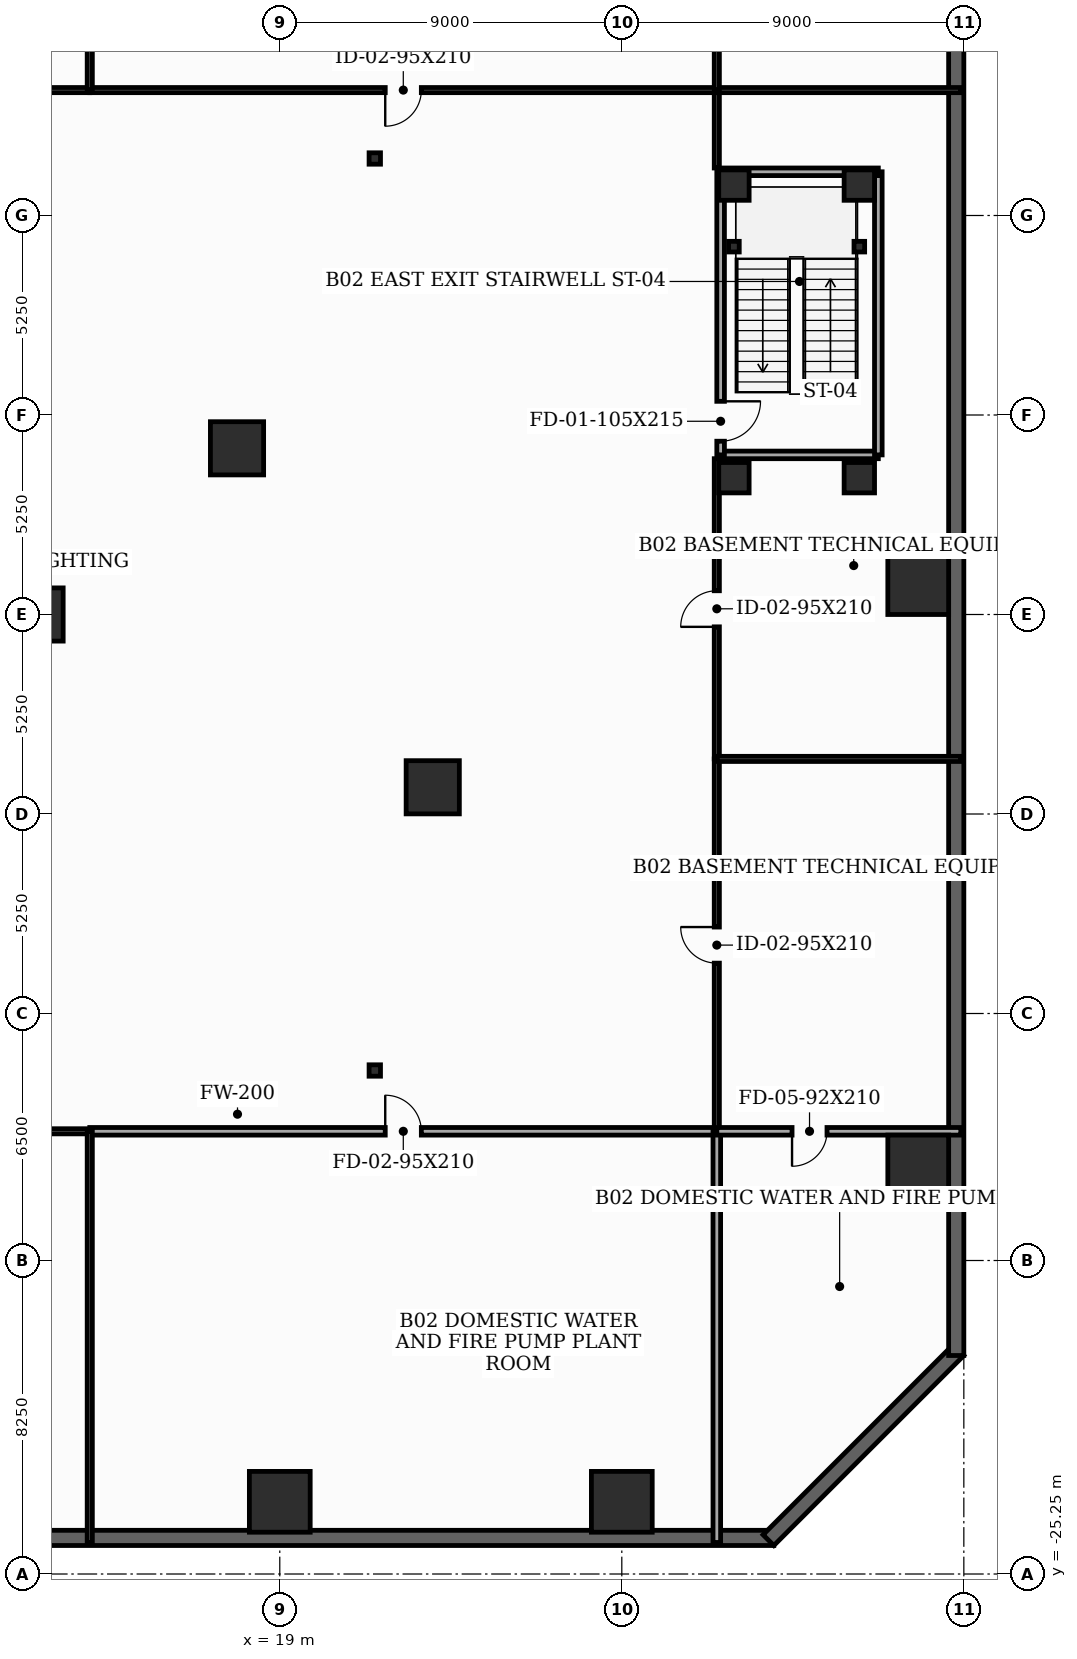
"""IFC4 building model, lengths in metres.
Left out: names, types, materials, properties, quantities, classifications, styles, units other than length and angle.
Written with IfcOpenShell. Run it as: python <this file> out.ifc"""

import sys

from ifc_helpers import new_model, si_unit, direction, frame, frame_2d, origin, origin_2d, place, context, subcontext, project, spatial, rectangle, i_section, extrude, element, fill, save


model = new_model("IFC4")
c1 = context("Model", 3, precision=1e-05, world=origin(), true_north=direction((0.0, 1.0)))
c2 = subcontext(c1, "Body", "Model", "MODEL_VIEW")
j1 = project(units=[si_unit("LENGTHUNIT", "METRE"), si_unit("PLANEANGLEUNIT", "RADIAN")], contexts=[c1])
p1 = place(None, origin())
s1 = spatial("IfcSite", under=j1, at=p1, CompositionType="ELEMENT")
p2 = place(p1, origin())
s2 = spatial("IfcBuilding", under=s1, at=p2, CompositionType="ELEMENT")
p3 = place(p2, frame((0.0, 0.0, -9.6)))
s3 = spatial("IfcBuildingStorey", under=s2, at=p3, CompositionType="ELEMENT", Elevation=-9.6)
p4 = place(p3, frame((12.6, 0.0, 0.0), z_axis=(0.0, 0.0, 1.0), x_axis=(1.0, 0.0, 0.0)))
e1 = element("IfcColumn", 1, at=p4, inside=s3, PredefinedType="COLUMN", context=c2, shape_type="SweptSolid", body=[
    extrude(rectangle(XDim=1.4, YDim=1.4, at=origin_2d()), origin(), (0.0, 0.0, 1.0), 4.8),
])
for number, where, z_axis, x_axis in (
    (2, (19.0, -23.35, 0.0), (0.0, 0.0, 1.0), (1.0, 0.0, 0.0)),
    (3, (28.0, -23.35, 0.0), (0.0, 0.0, 1.0), (1.0, 0.0, 0.0)),
    (4, (35.8, -14.5, 0.0), (0.0, 0.0, 1.0), (1.0, 0.0, 0.0)),
    (5, (35.8, 0.8, 0.0), (0.0, 0.0, 1.0), (1.0, 0.0, 0.0)),
):
    element("IfcColumn", number, at=place(p3, frame(where, z_axis=z_axis, x_axis=x_axis)), inside=s3, PredefinedType="COLUMN", context=c2, shape_type="SweptSolid", body=[
        extrude(rectangle(XDim=1.6, YDim=1.6, at=origin_2d()), origin(), (0.0, 0.0, 1.0), 4.8),
    ])
for number, where, z_axis, x_axis in (
    (6, (23.025, -4.547, 0.0), (0.0, 0.0, 1.0), (1.0, 0.0, 0.0)),
    (7, (17.875, 4.373, 0.0), (0.0, 0.0, 1.0), (1.0, 0.0, 0.0)),
):
    element("IfcColumn", number, at=place(p3, frame(where, z_axis=z_axis, x_axis=x_axis)), inside=s3, PredefinedType="COLUMN", context=c2, shape_type="SweptSolid", body=[
        extrude(rectangle(XDim=1.4, YDim=1.4, at=origin_2d()), origin(), (0.0, 0.0, 1.0), 4.8),
    ])
for number, where, z_axis, x_axis in (
    (8, (21.5, -12.0, 0.0), (0.0, 0.0, 1.0), (1.0, 0.0, 0.0)),
    (9, (21.5, 12.0, 0.0), (0.0, 0.0, 1.0), (1.0, 0.0, 0.0)),
):
    element("IfcColumn", number, at=place(p3, frame(where, z_axis=z_axis, x_axis=x_axis)), inside=s3, PredefinedType="PILASTER", context=c2, shape_type="SweptSolid", body=[
        extrude(i_section(OverallWidth=0.3, OverallDepth=0.3, WebThickness=0.011, FlangeThickness=0.019, at=origin_2d()), origin(), (0.0, 0.0, 1.0), 4.8),
    ])
for number, where, z_axis, x_axis in (
    (10, (30.95, 3.6, 0.0), (0.0, 0.0, 1.0), (1.0, 0.0, 0.0)),
    (11, (34.25, 3.6, 0.0), (0.0, 0.0, 1.0), (1.0, 0.0, 0.0)),
    (12, (34.25, 11.3, 0.0), (0.0, 0.0, 1.0), (1.0, 0.0, 0.0)),
    (13, (30.95, 11.3, 0.0), (0.0, 0.0, 1.0), (1.0, 0.0, 0.0)),
):
    element("IfcColumn", number, at=place(p3, frame(where, z_axis=z_axis, x_axis=x_axis)), inside=s3, PredefinedType="COLUMN", context=c2, shape_type="SweptSolid", body=[
        extrude(rectangle(XDim=0.8, YDim=0.8, at=origin_2d()), origin(), (0.0, 0.0, 1.0), 4.8),
    ])
for number, where, z_axis, x_axis in (
    (14, (30.95, 9.68, 0.0), (0.0, 0.0, 1.0), (1.0, 0.0, 0.0)),
    (15, (34.25, 9.68, 0.0), (0.0, 0.0, 1.0), (1.0, 0.0, 0.0)),
):
    element("IfcColumn", number, at=place(p3, frame(where, z_axis=z_axis, x_axis=x_axis)), inside=s3, PredefinedType="PILASTER", context=c2, shape_type="SweptSolid", body=[
        extrude(i_section(OverallWidth=0.28, OverallDepth=0.28, WebThickness=0.01, FlangeThickness=0.018, at=origin_2d()), origin(), (0.0, 0.0, 1.0), 4.8),
    ])
p5 = place(p3, frame((-32.0, -24.3, 0.0), z_axis=(0.0, 0.0, 1.0), x_axis=(1.0, 0.0, 0.0)))
e16 = element("IfcWall", 16, at=p5, inside=s3, PredefinedType="USERDEFINED", context=c2, shape_type="SweptSolid", body=[
    extrude(rectangle(XDim=64.0, YDim=0.4, at=frame_2d((32.0, 0.0))), origin(), (0.0, 0.0, 1.0), 4.52),
])
p6 = place(p3, frame((31.859, -24.359, 0.0), z_axis=(0.0, 0.0, 1.0), x_axis=(0.707106781187, 0.707106781187, 0.0)))
e17 = element("IfcWall", 17, at=p6, inside=s3, PredefinedType="USERDEFINED", context=c2, shape_type="SweptSolid", body=[
    extrude(rectangle(XDim=7.071, YDim=0.4, at=frame_2d((3.536, 0.0))), origin(), (0.0, 0.0, 1.0), 4.52),
])
p7 = place(p3, frame((36.8, -19.5, 0.0), z_axis=(0.0, 0.0, 1.0), x_axis=(0.0, 1.0, 0.0)))
e18 = element("IfcWall", 18, at=p7, inside=s3, PredefinedType="USERDEFINED", context=c2, shape_type="SweptSolid", body=[
    extrude(rectangle(XDim=48.0, YDim=0.4, at=frame_2d((24.0, 0.0))), origin(), (0.0, 0.0, 1.0), 4.52),
])
p8 = place(p3, frame((30.6, 4.2, 0.0), z_axis=(0.0, 0.0, 1.0), x_axis=(1.0, 0.0, 0.0)))
e19 = element("IfcWall", 19, at=p8, inside=s3, PredefinedType="SOLIDWALL", context=c2, shape_type="SweptSolid", body=[
    extrude(rectangle(XDim=4.15, YDim=0.2, at=frame_2d((2.075, 0.0))), origin(), (0.0, 0.0, 1.0), 3.905),
])
p9 = place(p3, frame((34.75, 4.2, 0.0), z_axis=(0.0, 0.0, 1.0), x_axis=(0.0, 1.0, 0.0)))
e20 = element("IfcWall", 20, at=p9, inside=s3, PredefinedType="SOLIDWALL", context=c2, shape_type="SweptSolid", body=[
    extrude(rectangle(XDim=7.45, YDim=0.2, at=frame_2d((3.725, 0.0))), origin(), (0.0, 0.0, 1.0), 4.52),
])
p10 = place(p3, frame((34.75, 11.65, 0.0), z_axis=(0.0, 0.0, 1.0), x_axis=(-1.0, 0.0, 0.0)))
e21 = element("IfcWall", 21, at=p10, inside=s3, PredefinedType="SOLIDWALL", context=c2, shape_type="SweptSolid", body=[
    extrude(rectangle(XDim=4.15, YDim=0.2, at=frame_2d((2.075, 0.0))), origin(), (0.0, 0.0, 1.0), 4.52),
])
p11 = place(p3, frame((30.6, 11.65, 0.0), z_axis=(0.0, 0.0, 1.0), x_axis=(0.0, -1.0, 0.0)))
e22 = element("IfcWall", 22, at=p11, inside=s3, PredefinedType="SOLIDWALL", context=c2, shape_type="SweptSolid", body=[
    extrude(rectangle(XDim=7.45, YDim=0.2, at=frame_2d((3.725, 0.0))), origin(), (0.0, 0.0, 1.0), 3.905),
])
p12 = place(p11, frame((6.04, 0.0, 0.0)))
e23 = element("IfcOpeningElement", 23, at=p12, cuts=e22, PredefinedType="OPENING", context=c2, shape_type="SweptSolid", body=[
    extrude(rectangle(XDim=1.05, YDim=2.15, at=frame_2d((0.525, 1.075))), frame((0.0, 0.11, 0.0), z_axis=(0.0, -1.0, 0.0), x_axis=(1.0, 0.0, 0.0)), (0.0, 0.0, 1.0), 0.22),
])
p13 = place(p3, frame((-14.0, -13.6, 0.0), z_axis=(0.0, 0.0, 1.0), x_axis=(1.0, 0.0, 0.0)))
e24 = element("IfcWall", 24, at=p13, inside=s3, PredefinedType="PARTITIONING", context=c2, shape_type="SweptSolid", body=[
    extrude(rectangle(XDim=28.0, YDim=0.135, at=frame_2d((14.0, 0.0))), origin(), (0.0, 0.0, 1.0), 3.305),
])
p14 = place(p13, frame((10.165, 0.0, 0.0)))
e25 = element("IfcOpeningElement", 25, at=p14, cuts=e24, PredefinedType="OPENING", context=c2, shape_type="SweptSolid", body=[
    extrude(rectangle(XDim=0.95, YDim=2.1, at=frame_2d((0.475, 1.05))), frame((0.0, 0.077, 0.0), z_axis=(0.0, -1.0, 0.0), x_axis=(1.0, 0.0, 0.0)), (0.0, 0.0, 1.0), 0.155),
])
p15 = place(p3, frame((14.0, -13.6, 0.0), z_axis=(0.0, 0.0, 1.0), x_axis=(1.0, 0.0, 0.0)))
e26 = element("IfcWall", 26, at=p15, inside=s3, PredefinedType="SOLIDWALL", context=c2, shape_type="SweptSolid", body=[
    extrude(rectangle(XDim=16.5, YDim=0.2, at=frame_2d((8.25, 0.0))), origin(), (0.0, 0.0, 1.0), 3.305),
])
p16 = place(p15, frame((7.775, 0.0, 0.0)))
e27 = element("IfcOpeningElement", 27, at=p16, cuts=e26, PredefinedType="OPENING", context=c2, shape_type="SweptSolid", body=[
    extrude(rectangle(XDim=0.95, YDim=2.1, at=frame_2d((0.475, 1.05))), frame((0.0, 0.11, 0.0), z_axis=(0.0, -1.0, 0.0), x_axis=(1.0, 0.0, 0.0)), (0.0, 0.0, 1.0), 0.22),
])
p17 = place(p3, frame((30.5, -13.6, 0.0), z_axis=(0.0, 0.0, 1.0), x_axis=(0.0, 1.0, 0.0)))
e28 = element("IfcWall", 28, at=p17, inside=s3, PredefinedType="PARTITIONING", context=c2, shape_type="SweptSolid", body=[
    extrude(rectangle(XDim=9.8, YDim=0.135, at=frame_2d((4.9, 0.0))), origin(), (0.0, 0.0, 1.0), 3.305),
])
p18 = place(p17, frame((4.425, 0.0, 0.0)))
e29 = element("IfcOpeningElement", 29, at=p18, cuts=e28, PredefinedType="OPENING", context=c2, shape_type="SweptSolid", body=[
    extrude(rectangle(XDim=0.95, YDim=2.1, at=frame_2d((0.475, 1.05))), frame((0.0, 0.077, 0.0), z_axis=(0.0, -1.0, 0.0), x_axis=(1.0, 0.0, 0.0)), (0.0, 0.0, 1.0), 0.155),
])
p19 = place(p3, frame((30.5, -3.8, 0.0), z_axis=(0.0, 0.0, 1.0), x_axis=(0.0, 1.0, 0.0)))
e30 = element("IfcWall", 30, at=p19, inside=s3, PredefinedType="PARTITIONING", context=c2, shape_type="SweptSolid", body=[
    extrude(rectangle(XDim=7.9, YDim=0.135, at=frame_2d((3.95, 0.0))), origin(), (0.0, 0.0, 1.0), 3.305),
])
p20 = place(p19, frame((3.475, 0.0, 0.0)))
e31 = element("IfcOpeningElement", 31, at=p20, cuts=e30, PredefinedType="OPENING", context=c2, shape_type="SweptSolid", body=[
    extrude(rectangle(XDim=0.95, YDim=2.1, at=frame_2d((0.475, 1.05))), frame((0.0, 0.077, 0.0), z_axis=(0.0, -1.0, 0.0), x_axis=(1.0, 0.0, 0.0)), (0.0, 0.0, 1.0), 0.155),
])
p21 = place(p3, frame((30.5, 11.75, 0.0), z_axis=(0.0, 0.0, 1.0), x_axis=(0.0, 1.0, 0.0)))
e32 = element("IfcWall", 32, at=p21, inside=s3, PredefinedType="PARTITIONING", context=c2, shape_type="SweptSolid", body=[
    extrude(rectangle(XDim=2.05, YDim=0.135, at=frame_2d((1.025, 0.0))), origin(), (0.0, 0.0, 1.0), 4.52),
])
p22 = place(p3, frame((30.5, 13.8, 0.0), z_axis=(0.0, 0.0, 1.0), x_axis=(-1.0, 0.0, 0.0)))
e33 = element("IfcWall", 33, at=p22, inside=s3, PredefinedType="PARTITIONING", context=c2, shape_type="SweptSolid", body=[
    extrude(rectangle(XDim=16.5, YDim=0.135, at=frame_2d((8.25, 0.0))), origin(), (0.0, 0.0, 1.0), 3.805),
])
p23 = place(p22, frame((7.775, 0.0, 0.0)))
e34 = element("IfcOpeningElement", 34, at=p23, cuts=e33, PredefinedType="OPENING", context=c2, shape_type="SweptSolid", body=[
    extrude(rectangle(XDim=0.95, YDim=2.1, at=frame_2d((0.475, 1.05))), frame((0.0, 0.077, 0.0), z_axis=(0.0, -1.0, 0.0), x_axis=(1.0, 0.0, 0.0)), (0.0, 0.0, 1.0), 0.155),
])
p24 = place(p3, frame((14.0, 13.8, 0.0), z_axis=(0.0, 0.0, 1.0), x_axis=(-1.0, 0.0, 0.0)))
e35 = element("IfcWall", 35, at=p24, inside=s3, PredefinedType="PARTITIONING", context=c2, shape_type="SweptSolid", body=[
    extrude(rectangle(XDim=24.5, YDim=0.135, at=frame_2d((12.25, 0.0))), origin(), (0.0, 0.0, 1.0), 3.305),
])
p25 = place(p24, frame((8.835, 0.0, 0.0)))
e36 = element("IfcOpeningElement", 36, at=p25, cuts=e35, PredefinedType="OPENING", context=c2, shape_type="SweptSolid", body=[
    extrude(rectangle(XDim=0.95, YDim=2.1, at=frame_2d((0.475, 1.05))), frame((0.0, 0.077, 0.0), z_axis=(0.0, -1.0, 0.0), x_axis=(1.0, 0.0, 0.0)), (0.0, 0.0, 1.0), 0.155),
])
p26 = place(p3, frame((14.0, -24.42, 0.0), z_axis=(0.0, 0.0, 1.0), x_axis=(0.0, 1.0, 0.0)))
e37 = element("IfcWall", 37, at=p26, inside=s3, PredefinedType="PARTITIONING", context=c2, shape_type="SweptSolid", body=[
    extrude(rectangle(XDim=10.82, YDim=0.135, at=frame_2d((5.41, 0.0))), origin(), (0.0, 0.0, 1.0), 3.305),
])
p27 = place(p3, frame((30.5, -24.42, 0.0), z_axis=(0.0, 0.0, 1.0), x_axis=(0.0, 1.0, 0.0)))
e38 = element("IfcWall", 38, at=p27, inside=s3, PredefinedType="SOLIDWALL", context=c2, shape_type="SweptSolid", body=[
    extrude(rectangle(XDim=10.82, YDim=0.2, at=frame_2d((5.41, 0.0))), origin(), (0.0, 0.0, 1.0), 3.805),
])
p28 = place(p3, frame((36.92, -13.6, 0.0), z_axis=(0.0, 0.0, 1.0), x_axis=(-1.0, 0.0, 0.0)))
e39 = element("IfcWall", 39, at=p28, inside=s3, PredefinedType="SOLIDWALL", context=c2, shape_type="SweptSolid", body=[
    extrude(rectangle(XDim=6.42, YDim=0.2, at=frame_2d((3.21, 0.0))), origin(), (0.0, 0.0, 1.0), 3.305),
])
p29 = place(p28, frame((3.521, 0.0, 0.0)))
e40 = element("IfcOpeningElement", 40, at=p29, cuts=e39, PredefinedType="OPENING", context=c2, shape_type="SweptSolid", body=[
    extrude(rectangle(XDim=0.92, YDim=2.1, at=frame_2d((0.46, 1.05))), frame((0.0, 0.11, 0.0), z_axis=(0.0, -1.0, 0.0), x_axis=(1.0, 0.0, 0.0)), (0.0, 0.0, 1.0), 0.22),
])
for number, where, z_axis, x_axis in (
    (41, (36.92, -3.8, 0.0), (0.0, 0.0, 1.0), (-1.0, 0.0, 0.0)),
    (42, (36.92, 13.8, 0.0), (0.0, 0.0, 1.0), (-1.0, 0.0, 0.0)),
):
    element("IfcWall", number, at=place(p3, frame(where, z_axis=z_axis, x_axis=x_axis)), inside=s3, PredefinedType="PARTITIONING", context=c2, shape_type="SweptSolid", body=[
        extrude(rectangle(XDim=6.42, YDim=0.135, at=frame_2d((3.21, 0.0))), origin(), (0.0, 0.0, 1.0), 3.805),
    ])
p30 = place(p3, frame((30.5, 24.1, 0.0), z_axis=(0.0, 0.0, 1.0), x_axis=(0.0, -1.0, 0.0)))
e43 = element("IfcWall", 43, at=p30, inside=s3, PredefinedType="PARTITIONING", context=c2, shape_type="SweptSolid", body=[
    extrude(rectangle(XDim=10.3, YDim=0.135, at=frame_2d((5.15, 0.0))), origin(), (0.0, 0.0, 1.0), 3.305),
])
p31 = place(p30, frame((4.69, 0.0, 0.0)))
e44 = element("IfcOpeningElement", 44, at=p31, cuts=e43, PredefinedType="OPENING", context=c2, shape_type="SweptSolid", body=[
    extrude(rectangle(XDim=0.92, YDim=2.1, at=frame_2d((0.46, 1.05))), frame((0.0, 0.077, 0.0), z_axis=(0.0, -1.0, 0.0), x_axis=(1.0, 0.0, 0.0)), (0.0, 0.0, 1.0), 0.155),
])
p32 = place(p3, frame((14.0, 24.1, 0.0), z_axis=(0.0, 0.0, 1.0), x_axis=(0.0, -1.0, 0.0)))
e45 = element("IfcWall", 45, at=p32, inside=s3, PredefinedType="PARTITIONING", context=c2, shape_type="SweptSolid", body=[
    extrude(rectangle(XDim=10.3, YDim=0.135, at=frame_2d((5.15, 0.0))), origin(), (0.0, 0.0, 1.0), 3.305),
])
p33 = place(p12, origin())
e46 = element("IfcDoor", 46, at=p33, inside=s3, OperationType="SINGLE_SWING_LEFT", PredefinedType="DOOR", context=c2, shape_type="SweptSolid", body=[
    extrude(rectangle(XDim=1.05, YDim=2.15, at=frame_2d((0.525, 1.075))), frame((0.0, 0.025, 0.0), z_axis=(0.0, -1.0, 0.0), x_axis=(1.0, 0.0, 0.0)), (0.0, 0.0, 1.0), 0.05),
])
fill(e23, e46)
p34 = place(p16, origin())
e47 = element("IfcDoor", 47, at=p34, inside=s3, OperationType="SINGLE_SWING_LEFT", PredefinedType="DOOR", context=c2, shape_type="SweptSolid", body=[
    extrude(rectangle(XDim=0.95, YDim=2.1, at=frame_2d((0.475, 1.05))), frame((0.0, 0.025, 0.0), z_axis=(0.0, -1.0, 0.0), x_axis=(1.0, 0.0, 0.0)), (0.0, 0.0, 1.0), 0.05),
])
fill(e27, e47)
p35 = place(p18, origin())
e48 = element("IfcDoor", 48, at=p35, inside=s3, OperationType="SINGLE_SWING_RIGHT", PredefinedType="DOOR", context=c2, shape_type="SweptSolid", body=[
    extrude(rectangle(XDim=0.95, YDim=2.1, at=frame_2d((0.475, 1.05))), frame((0.0, 0.025, 0.0), z_axis=(0.0, -1.0, 0.0), x_axis=(1.0, 0.0, 0.0)), (0.0, 0.0, 1.0), 0.05),
])
fill(e29, e48)
p36 = place(p20, origin())
e49 = element("IfcDoor", 49, at=p36, inside=s3, OperationType="SINGLE_SWING_LEFT", PredefinedType="DOOR", context=c2, shape_type="SweptSolid", body=[
    extrude(rectangle(XDim=0.95, YDim=2.1, at=frame_2d((0.475, 1.05))), frame((0.0, 0.025, 0.0), z_axis=(0.0, -1.0, 0.0), x_axis=(1.0, 0.0, 0.0)), (0.0, 0.0, 1.0), 0.05),
])
fill(e31, e49)
p37 = place(p23, origin())
e50 = element("IfcDoor", 50, at=p37, inside=s3, OperationType="SINGLE_SWING_RIGHT", PredefinedType="DOOR", context=c2, shape_type="SweptSolid", body=[
    extrude(rectangle(XDim=0.95, YDim=2.1, at=frame_2d((0.475, 1.05))), frame((0.0, 0.025, 0.0), z_axis=(0.0, -1.0, 0.0), x_axis=(1.0, 0.0, 0.0)), (0.0, 0.0, 1.0), 0.05),
])
fill(e34, e50)
p38 = place(p29, origin())
e51 = element("IfcDoor", 51, at=p38, inside=s3, OperationType="SINGLE_SWING_RIGHT", PredefinedType="DOOR", context=c2, shape_type="SweptSolid", body=[
    extrude(rectangle(XDim=0.92, YDim=2.1, at=frame_2d((0.46, 1.05))), frame((0.0, 0.025, 0.0), z_axis=(0.0, -1.0, 0.0), x_axis=(1.0, 0.0, 0.0)), (0.0, 0.0, 1.0), 0.05),
])
fill(e40, e51)
save(model, sys.argv[1])
